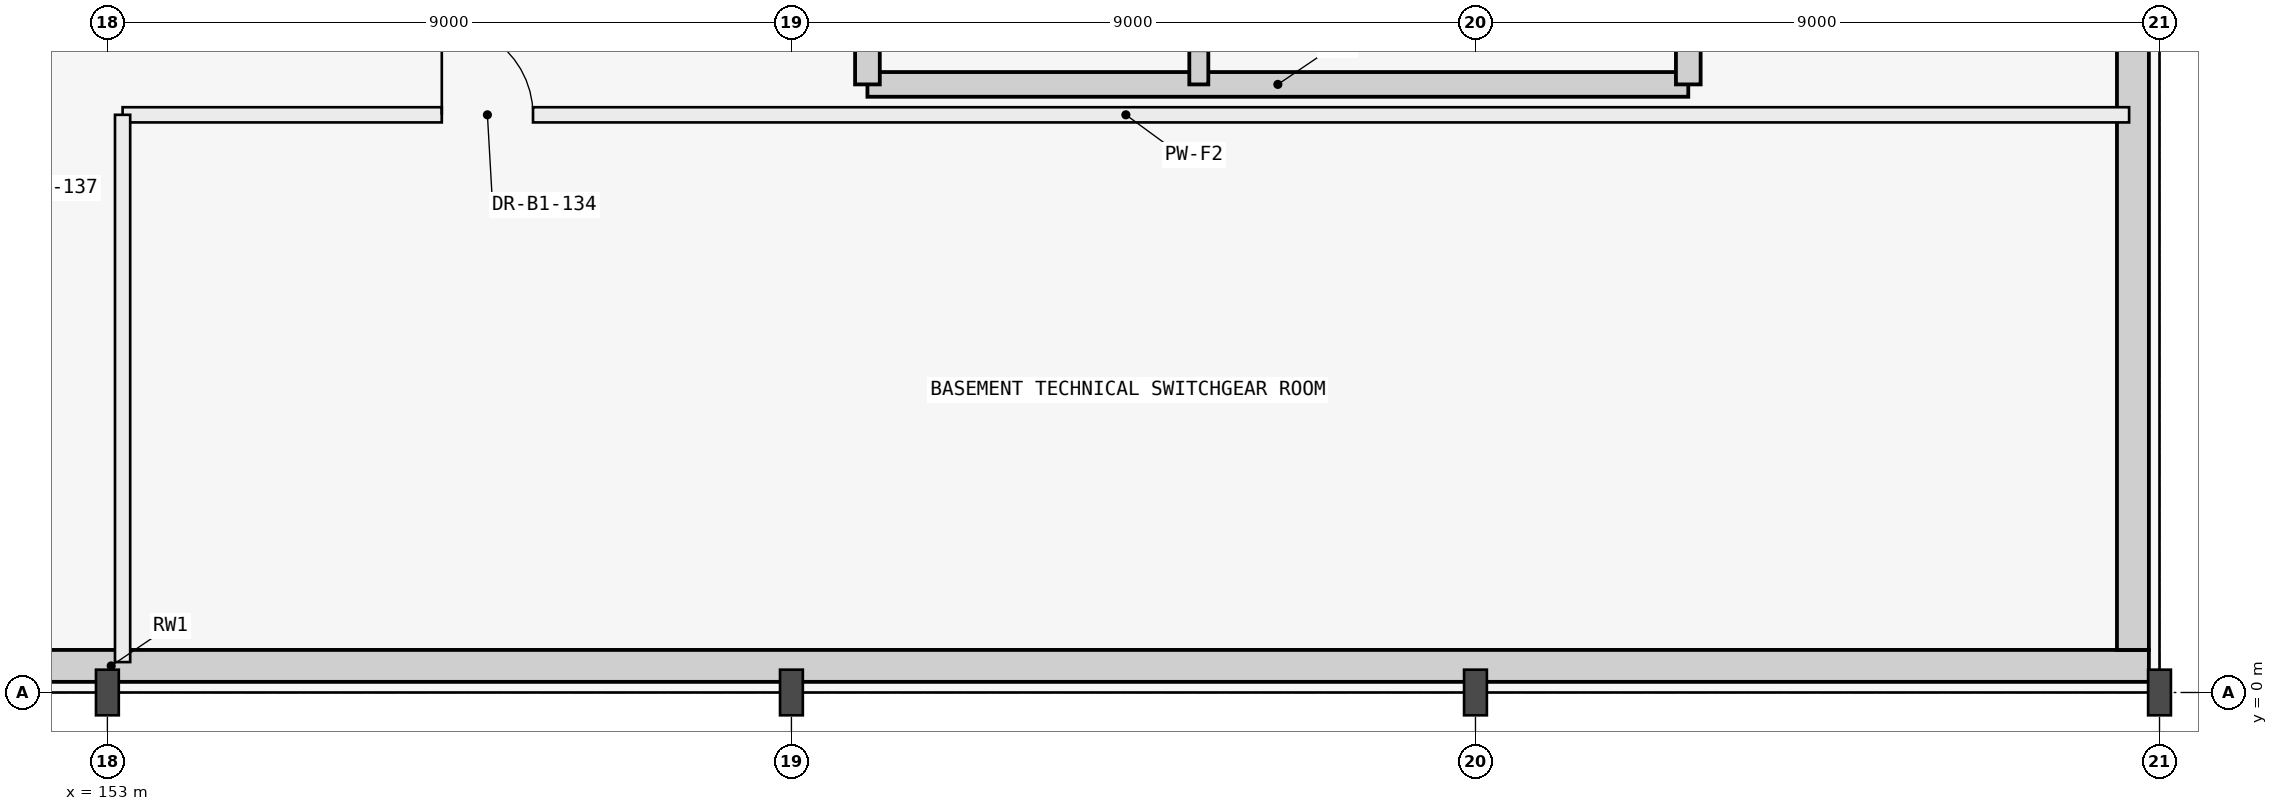
"""IFC4 building model, lengths in metres.
Left out: names, types, materials, properties, quantities, classifications, styles, units other than length and angle.
Written with IfcOpenShell. Run it as: python <this file> out.ifc"""

import sys

from ifc_helpers import new_model, si_unit, direction, frame, frame_2d, origin, origin_2d, place, context, subcontext, project, spatial, rectangle, i_section, extrude, element, fill, save


model = new_model("IFC4")
c1 = context("Model", 3, precision=1e-05, world=origin(), true_north=direction((0.0, 1.0)))
c2 = subcontext(c1, "Body", "Model", "MODEL_VIEW")
j1 = project(units=[si_unit("LENGTHUNIT", "METRE"), si_unit("PLANEANGLEUNIT", "RADIAN")], contexts=[c1])
p1 = place(None, origin())
s1 = spatial("IfcSite", under=j1, at=p1, CompositionType="ELEMENT")
p2 = place(p1, origin())
s2 = spatial("IfcBuilding", under=s1, at=p2, CompositionType="ELEMENT")
p3 = place(p2, frame((0.0, 0.0, -4.2)))
s3 = spatial("IfcBuildingStorey", under=s2, at=p3, CompositionType="ELEMENT", Elevation=-4.2)
for number, where, z_axis, x_axis in (
    (1, (153.0, 0.0, 0.0), (0.0, 0.0, 1.0), (1.0, 0.0, 0.0)),
    (2, (162.0, 0.0, 0.0), (0.0, 0.0, 1.0), (1.0, 0.0, 0.0)),
    (3, (171.0, 0.0, 0.0), (0.0, 0.0, 1.0), (1.0, 0.0, 0.0)),
    (4, (180.0, 0.0, 0.0), (0.0, 0.0, 1.0), (1.0, 0.0, 0.0)),
):
    element("IfcColumn", number, at=place(p3, frame(where, z_axis=z_axis, x_axis=x_axis)), inside=s3, PredefinedType="COLUMN", context=c2, shape_type="SweptSolid", body=[
        extrude(i_section(OverallWidth=0.3, OverallDepth=0.6, WebThickness=0.015, FlangeThickness=0.03, FilletRadius=0.027, at=origin_2d()), origin(), (0.0, 0.0, 1.0), 4.2),
    ])
p4 = place(p3, frame((126.24, 0.35, 0.0), z_axis=(0.0, 0.0, 1.0), x_axis=(1.0, 0.0, 0.0)))
e5 = element("IfcWall", 5, at=p4, inside=s3, PredefinedType="USERDEFINED", context=c2, shape_type="SweptSolid", body=[
    extrude(rectangle(XDim=53.62, YDim=0.42, at=frame_2d((26.81, 0.0))), origin(), (0.0, 0.0, 1.0), 3.6),
])
p5 = place(p3, frame((179.65, 0.56, 0.0), z_axis=(0.0, 0.0, 1.0), x_axis=(0.0, 1.0, 0.0)))
e6 = element("IfcWall", 6, at=p5, inside=s3, PredefinedType="USERDEFINED", context=c2, shape_type="SweptSolid", body=[
    extrude(rectangle(XDim=62.28, YDim=0.42, at=frame_2d((31.14, 0.0))), origin(), (0.0, 0.0, 1.0), 3.6),
])
p6 = place(p3, frame((163.0, 8.0, 0.0), z_axis=(0.0, 0.0, 1.0), x_axis=(1.0, 0.0, 0.0)))
e7 = element("IfcWall", 7, at=p6, inside=s3, PredefinedType="SHEAR", context=c2, shape_type="SweptSolid", body=[
    extrude(rectangle(XDim=10.8, YDim=0.325, at=frame_2d((5.4, 0.0))), origin(), (0.0, 0.0, 1.0), 3.94),
])
for number, where, z_axis, x_axis in (
    (8, (173.8, 8.0, 0.0), (0.0, 0.0, 1.0), (0.0, 1.0, 0.0)),
    (9, (163.0, 17.5, 0.0), (0.0, 0.0, 1.0), (0.0, -1.0, 0.0)),
):
    element("IfcWall", number, at=place(p3, frame(where, z_axis=z_axis, x_axis=x_axis)), inside=s3, PredefinedType="SHEAR", context=c2, shape_type="SweptSolid", body=[
        extrude(rectangle(XDim=9.5, YDim=0.325, at=frame_2d((4.75, 0.0))), origin(), (0.0, 0.0, 1.0), 3.94),
    ])
p7 = place(p3, frame((167.36, 8.0, 0.0), z_axis=(0.0, 0.0, 1.0), x_axis=(0.0, 1.0, 0.0)))
e10 = element("IfcWall", 10, at=p7, inside=s3, PredefinedType="SHEAR", context=c2, shape_type="SweptSolid", body=[
    extrude(rectangle(XDim=7.2, YDim=0.25, at=frame_2d((3.6, 0.0))), origin(), (0.0, 0.0, 1.0), 3.94),
])
p8 = place(p7, frame((0.45, 0.0, 0.0)))
e11 = element("IfcOpeningElement", 11, at=p8, cuts=e10, PredefinedType="OPENING", context=c2, shape_type="SweptSolid", body=[
    extrude(rectangle(XDim=1.15, YDim=2.15, at=frame_2d((0.575, 1.075))), frame((0.0, 0.135, 0.0), z_axis=(0.0, -1.0, 0.0), x_axis=(1.0, 0.0, 0.0)), (0.0, 0.0, 1.0), 0.27),
])
p9 = place(p3, frame((153.2, 7.6, 0.0), z_axis=(0.0, 0.0, 1.0), x_axis=(1.0, 0.0, 0.0)))
e12 = element("IfcWall", 12, at=p9, inside=s3, PredefinedType="PARTITIONING", context=c2, shape_type="SweptSolid", body=[
    extrude(rectangle(XDim=26.4, YDim=0.2, at=frame_2d((13.2, 0.0))), origin(), (0.0, 0.0, 1.0), 3.94),
])
p10 = place(p9, frame((4.2, 0.0, 0.0)))
e13 = element("IfcOpeningElement", 13, at=p10, cuts=e12, PredefinedType="OPENING", context=c2, shape_type="SweptSolid", body=[
    extrude(rectangle(XDim=1.2, YDim=2.15, at=frame_2d((0.6, 1.075))), frame((0.0, 0.11, 0.0), z_axis=(0.0, -1.0, 0.0), x_axis=(1.0, 0.0, 0.0)), (0.0, 0.0, 1.0), 0.22),
])
p11 = place(p3, frame((153.2, 0.4, 0.0), z_axis=(0.0, 0.0, 1.0), x_axis=(0.0, 1.0, 0.0)))
e14 = element("IfcWall", 14, at=p11, inside=s3, PredefinedType="PARTITIONING", context=c2, shape_type="SweptSolid", body=[
    extrude(rectangle(XDim=7.2, YDim=0.2, at=frame_2d((3.6, 0.0))), origin(), (0.0, 0.0, 1.0), 3.465),
])
p12 = place(p10, origin())
e15 = element("IfcDoor", 15, at=p12, inside=s3, OperationType="SINGLE_SWING_LEFT", PredefinedType="DOOR", context=c2, shape_type="SweptSolid", body=[
    extrude(rectangle(XDim=1.2, YDim=2.15, at=frame_2d((0.6, 1.075))), frame((0.0, 0.025, 0.0), z_axis=(0.0, -1.0, 0.0), x_axis=(1.0, 0.0, 0.0)), (0.0, 0.0, 1.0), 0.05),
])
fill(e13, e15)
save(model, sys.argv[1])
